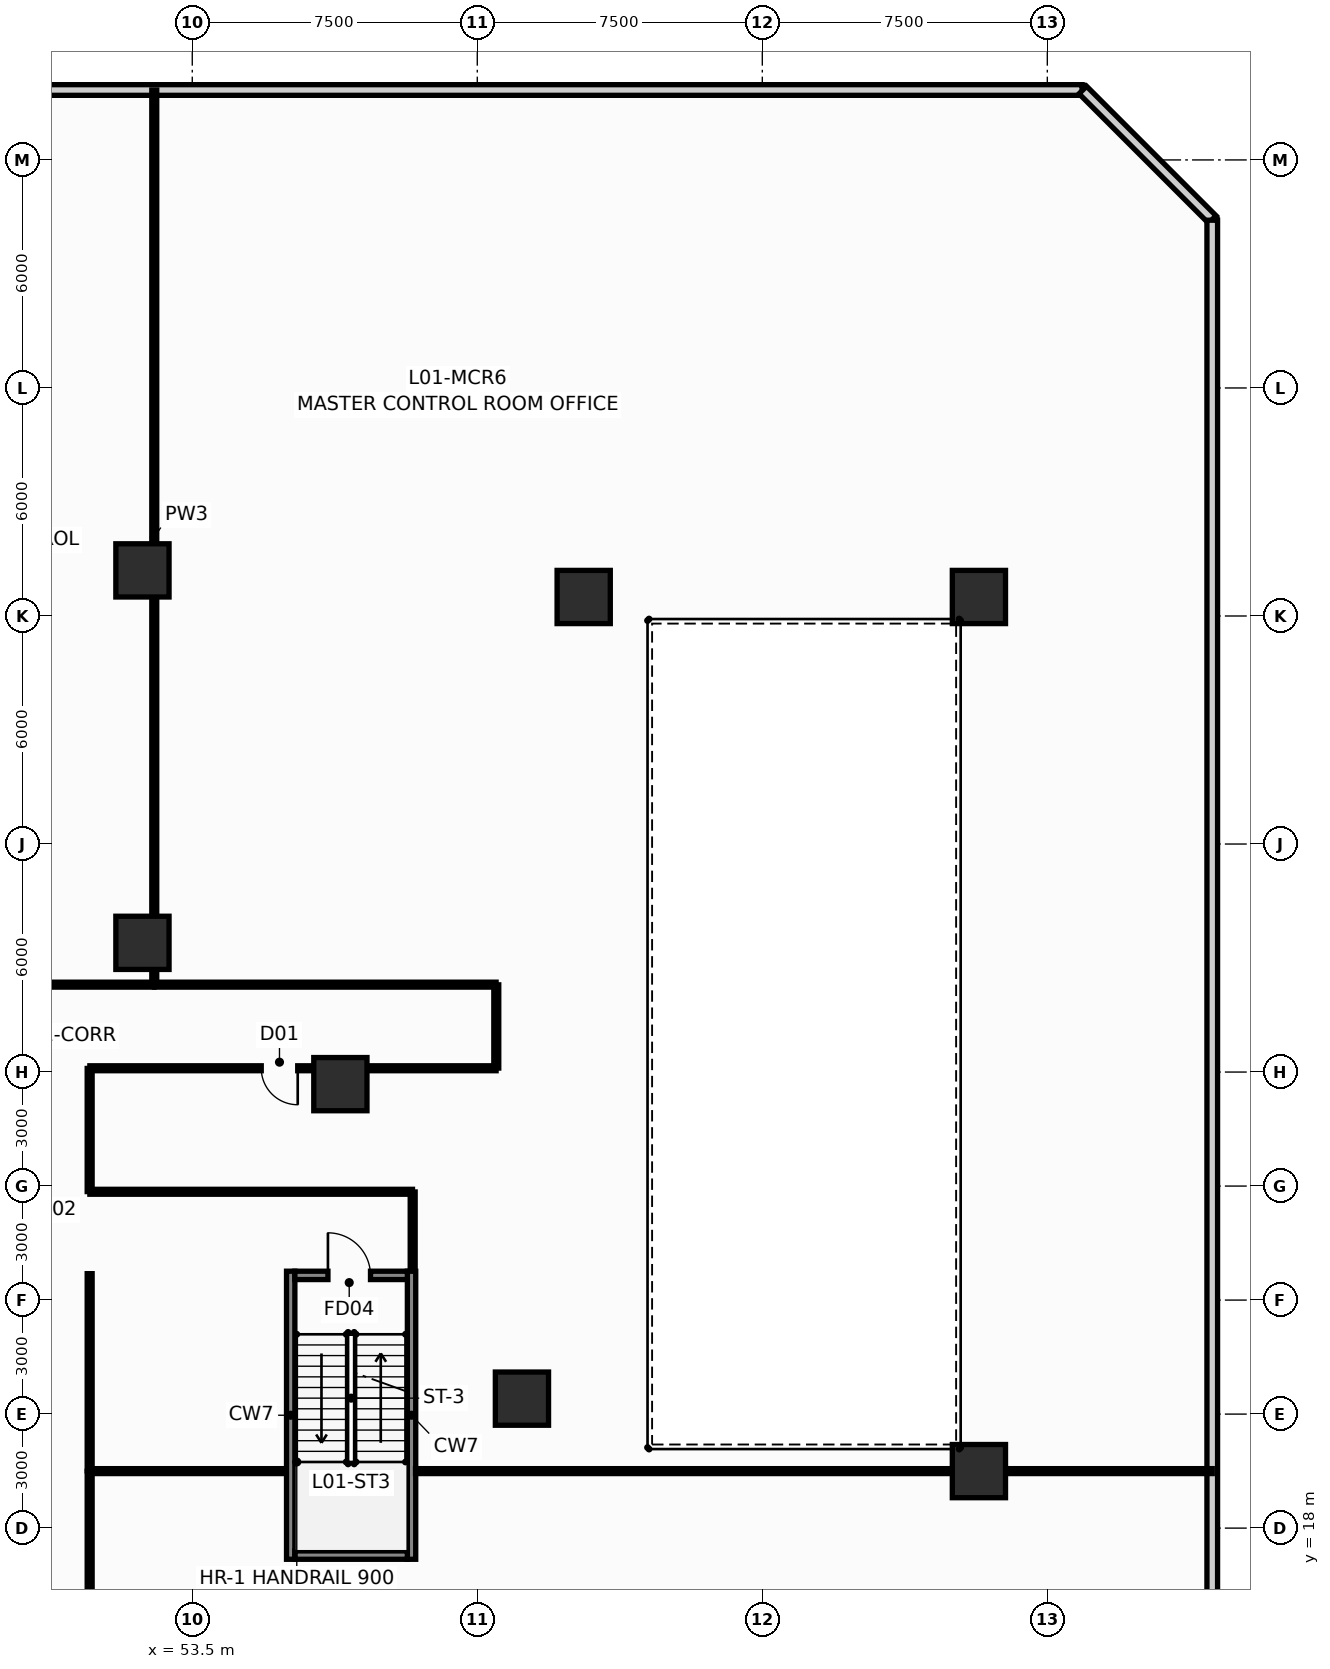
"""IFC4 building model, lengths in metres.
Left out: names, types, materials, properties, quantities, classifications, styles, units other than length and angle.
Written with IfcOpenShell. Run it as: python <this file> out.ifc"""

import sys

from ifc_helpers import new_model, si_unit, direction, frame, frame_2d, origin, origin_2d, place, context, subcontext, project, spatial, rectangle, hollow_rectangle, extrude, source, transform, mapped, element, fill, save


model = new_model("IFC4")
c1 = context("Model", 3, precision=1e-05, world=origin(), true_north=direction((0.0, 1.0)))
c2 = subcontext(c1, "Body", "Model", "MODEL_VIEW")
j1 = project(units=[si_unit("LENGTHUNIT", "METRE"), si_unit("PLANEANGLEUNIT", "RADIAN")], contexts=[c1])
p1 = place(None, origin())
s1 = spatial("IfcSite", under=j1, at=p1, CompositionType="ELEMENT")
p2 = place(p1, origin())
s2 = spatial("IfcBuilding", under=s1, at=p2, CompositionType="ELEMENT")
p3 = place(p2, frame((0.0, 0.0, 5.4)))
s3 = spatial("IfcBuildingStorey", under=s2, at=p3, CompositionType="ELEMENT", Elevation=5.4)
for number, where, z_axis, x_axis in (
    (1, (56.09, 17.18, 0.0), (0.0, 0.0, 1.0), (0.0, 1.0, 0.0)),
    (2, (59.27, 17.18, 0.0), (0.0, 0.0, 1.0), (0.0, 1.0, 0.0)),
):
    element("IfcWall", number, at=place(p3, frame(where, z_axis=z_axis, x_axis=x_axis)), inside=s3, PredefinedType="SHEAR", context=c2, shape_type="SweptSolid", body=[
        extrude(rectangle(XDim=7.58, YDim=0.22, at=frame_2d((3.79, 0.0))), origin(), (0.0, 0.0, 1.0), 4.8),
    ])
p4 = place(p3, frame((56.2, 17.29, 0.0), z_axis=(0.0, 0.0, 1.0), x_axis=(1.0, 0.0, 0.0)))
e3 = element("IfcWall", 3, at=p4, inside=s3, PredefinedType="SHEAR", context=c2, shape_type="SweptSolid", body=[
    extrude(rectangle(XDim=2.96, YDim=0.22, at=frame_2d((1.48, 0.0))), origin(), (0.0, 0.0, 1.0), 4.8),
])
p5 = place(p3, frame((56.2, 24.65, 0.0), z_axis=(0.0, 0.0, 1.0), x_axis=(1.0, 0.0, 0.0)))
e4 = element("IfcWall", 4, at=p5, inside=s3, PredefinedType="SHEAR", context=c2, shape_type="SweptSolid", body=[
    extrude(rectangle(XDim=2.96, YDim=0.22, at=frame_2d((1.48, 0.0))), origin(), (0.0, 0.0, 1.0), 4.8),
])
p6 = place(p5, frame((0.87, 0.0, 0.0)))
e5 = element("IfcOpeningElement", 5, at=p6, cuts=e4, PredefinedType="OPENING", context=c2, shape_type="SweptSolid", body=[
    extrude(rectangle(XDim=1.12, YDim=2.15, at=frame_2d((0.56, 1.075))), frame((0.0, 0.122, 0.0), z_axis=(0.0, -1.0, 0.0), x_axis=(1.0, 0.0, 0.0)), (0.0, 0.0, 1.0), 0.244),
])
m1 = source(origin(), c2, "Body", "SweptSolid", [
    extrude(hollow_rectangle(XDim=1.4, YDim=1.4, WallThickness=0.08, at=origin_2d()), origin(), (0.0, 0.0, 1.0), 4.802),
])
p7 = place(p3, frame((62.175, 21.407, 0.0), z_axis=(-0.01042374304, -0.021559351459, 0.999713228854), x_axis=(0.900293483537, -0.435283405956, 0.0)))
e6 = element("IfcColumn", 6, at=p7, inside=s3, PredefinedType="COLUMN", context=c2, shape_type="MappedRepresentation", body=[
    mapped(m1, transform((0.0, 0.0, 0.0), scale=1.0)),
])
m2 = source(origin(), c2, "Body", "SweptSolid", [
    extrude(hollow_rectangle(XDim=1.4, YDim=1.4, WallThickness=0.08, at=origin_2d()), origin(), (0.0, 0.0, 1.0), 4.801),
])
p8 = place(p3, frame((57.397, 29.682, 0.0), z_axis=(-0.014899529501, -0.013780793498, 0.999794025663), x_axis=(0.679008224545, -0.734130663438, 0.0)))
e7 = element("IfcColumn", 7, at=p8, inside=s3, PredefinedType="COLUMN", context=c2, shape_type="MappedRepresentation", body=[
    mapped(m2, transform((0.0, 0.0, 0.0), scale=1.0)),
])
m3 = source(origin(), c2, "Body", "SweptSolid", [
    extrude(hollow_rectangle(XDim=1.4, YDim=1.4, WallThickness=0.08, at=origin_2d()), origin(), (0.0, 0.0, 1.0), 4.8),
])
for number, where, z_axis, x_axis in (
    (8, (52.189, 33.4, 0.0), (0.0, 0.0, 1.0), (1.0, 0.0, 0.0)),
    (9, (52.189, 43.2, 0.0), (0.0, 0.0, 1.0), (1.0, 0.0, 0.0)),
    (10, (74.2, 19.5, 0.0), (0.0, 0.0, 1.0), (1.0, 0.0, 0.0)),
    (11, (74.2, 42.5, 0.0), (0.0, 0.0, 1.0), (1.0, 0.0, 0.0)),
    (12, (63.8, 42.5, 0.0), (0.0, 0.0, 1.0), (1.0, 0.0, 0.0)),
):
    element("IfcColumn", number, at=place(p3, frame(where, z_axis=z_axis, x_axis=x_axis)), inside=s3, PredefinedType="COLUMN", context=c2, shape_type="MappedRepresentation", body=[
        mapped(m3, transform((0.0, 0.0, 0.0), scale=1.0)),
    ])
p9 = place(p3, frame((5.086, 55.84, 0.0), z_axis=(0.0, 0.0, 1.0), x_axis=(1.0, 0.0, 0.0)))
e13 = element("IfcWall", 13, at=p9, inside=s3, PredefinedType="STANDARD", context=c2, shape_type="SweptSolid", body=[
    extrude(rectangle(XDim=71.828, YDim=0.28, at=frame_2d((35.914, 0.0))), origin(), (0.0, 0.0, 1.0), 4.48),
])
p10 = place(p3, frame((76.934, 55.84, 0.0), z_axis=(0.0, 0.0, 1.0), x_axis=(0.707106781187, -0.707106781187, 0.0)))
e14 = element("IfcWall", 14, at=p10, inside=s3, PredefinedType="STANDARD", context=c2, shape_type="SweptSolid", body=[
    extrude(rectangle(XDim=4.817, YDim=0.28, at=frame_2d((2.408, 0.0))), origin(), (0.0, 0.0, 1.0), 4.48),
])
p11 = place(p3, frame((80.34, 52.414, 0.0), z_axis=(0.0, 0.0, 1.0), x_axis=(0.0, -1.0, 0.0)))
e15 = element("IfcWall", 15, at=p11, inside=s3, PredefinedType="STANDARD", context=c2, shape_type="SweptSolid", body=[
    extrude(rectangle(XDim=47.828, YDim=0.28, at=frame_2d((23.914, 0.0))), origin(), (0.0, 0.0, 1.0), 4.48),
])
p12 = place(p3, frame((52.5, 32.305, 0.0), z_axis=(0.0, 0.0, 1.0), x_axis=(0.0, 1.0, 0.0)))
e16 = element("IfcWall", 16, at=p12, inside=s3, PredefinedType="PARTITIONING", context=c2, shape_type="SweptSolid", body=[
    extrude(rectangle(XDim=23.535, YDim=0.13, at=frame_2d((11.768, 0.0))), origin(), (0.0, 0.0, 1.0), 3.465),
])
p13 = place(p3, frame((59.375, 19.5, 0.0), z_axis=(0.0, 0.0, 1.0), x_axis=(1.0, 0.0, 0.0)))
e17 = element("IfcWall", 17, at=p13, inside=s3, PredefinedType="PARTITIONING", context=c2, shape_type="SweptSolid", body=[
    extrude(rectangle(XDim=20.965, YDim=0.13, at=frame_2d((10.482, 0.0))), origin(), (0.0, 0.0, 1.0), 2.665),
])
p14 = place(p3, frame((61.495, 30.1, 0.0), z_axis=(0.0, 0.0, 1.0), x_axis=(-1.0, 0.0, 0.0)))
e18 = element("IfcWall", 18, at=p14, inside=s3, PredefinedType="PARTITIONING", context=c2, shape_type="SweptSolid", body=[
    extrude(rectangle(XDim=10.69, YDim=0.13, at=frame_2d((5.345, 0.0))), origin(), (0.0, 0.0, 1.0), 3.854),
])
p15 = place(p14, frame((5.22, 0.0, 0.0)))
e19 = element("IfcOpeningElement", 19, at=p15, cuts=e18, PredefinedType="OPENING", context=c2, shape_type="SweptSolid", body=[
    extrude(rectangle(XDim=0.96, YDim=2.15, at=frame_2d((0.48, 1.075))), frame((0.0, 0.077, 0.0), z_axis=(0.0, -1.0, 0.0), x_axis=(1.0, 0.0, 0.0)), (0.0, 0.0, 1.0), 0.154),
])
p16 = place(p3, frame((42.505, 32.3, 0.0), z_axis=(0.0, 0.0, 1.0), x_axis=(1.0, 0.0, 0.0)))
e20 = element("IfcWall", 20, at=p16, inside=s3, PredefinedType="PARTITIONING", context=c2, shape_type="SweptSolid", body=[
    extrude(rectangle(XDim=9.99, YDim=0.13, at=frame_2d((4.995, 0.0))), origin(), (0.0, 0.0, 1.0), 4.48),
])
p17 = place(p16, frame((4.515, 0.0, 0.0)))
e21 = element("IfcOpeningElement", 21, at=p17, cuts=e20, PredefinedType="OPENING", context=c2, shape_type="SweptSolid", body=[
    extrude(rectangle(XDim=0.96, YDim=2.15, at=frame_2d((0.48, 1.075))), frame((0.0, 0.077, 0.0), z_axis=(0.0, -1.0, 0.0), x_axis=(1.0, 0.0, 0.0)), (0.0, 0.0, 1.0), 0.154),
])
p18 = place(p3, frame((52.505, 32.3, 0.0), z_axis=(0.0, 0.0, 1.0), x_axis=(1.0, 0.0, 0.0)))
e22 = element("IfcWall", 22, at=p18, inside=s3, PredefinedType="PARTITIONING", context=c2, shape_type="SweptSolid", body=[
    extrude(rectangle(XDim=8.99, YDim=0.13, at=frame_2d((4.495, 0.0))), origin(), (0.0, 0.0, 1.0), 4.48),
])
p19 = place(p3, frame((50.805, 26.85, 0.0), z_axis=(0.0, 0.0, 1.0), x_axis=(1.0, 0.0, 0.0)))
e23 = element("IfcWall", 23, at=p19, inside=s3, PredefinedType="PARTITIONING", context=c2, shape_type="SweptSolid", body=[
    extrude(rectangle(XDim=8.49, YDim=0.13, at=frame_2d((4.245, 0.0))), origin(), (0.0, 0.0, 1.0), 4.48),
])
p20 = place(p3, frame((50.8, 12.205, 0.0), z_axis=(0.0, 0.0, 1.0), x_axis=(0.0, 1.0, 0.0)))
e24 = element("IfcWall", 24, at=p20, inside=s3, PredefinedType="PARTITIONING", context=c2, shape_type="SweptSolid", body=[
    extrude(rectangle(XDim=7.29, YDim=0.13, at=frame_2d((3.645, 0.0))), origin(), (0.0, 0.0, 1.0), 4.48),
])
p21 = place(p20, frame((3.165, 0.0, 0.0)))
e25 = element("IfcOpeningElement", 25, at=p21, cuts=e24, PredefinedType="OPENING", context=c2, shape_type="SweptSolid", body=[
    extrude(rectangle(XDim=0.96, YDim=2.15, at=frame_2d((0.48, 1.075))), frame((0.0, 0.077, 0.0), z_axis=(0.0, -1.0, 0.0), x_axis=(1.0, 0.0, 0.0)), (0.0, 0.0, 1.0), 0.154),
])
p22 = place(p3, frame((50.805, 19.5, 0.0), z_axis=(0.0, 0.0, 1.0), x_axis=(1.0, 0.0, 0.0)))
e26 = element("IfcWall", 26, at=p22, inside=s3, PredefinedType="PARTITIONING", context=c2, shape_type="SweptSolid", body=[
    extrude(rectangle(XDim=5.17, YDim=0.13, at=frame_2d((2.585, 0.0))), origin(), (0.0, 0.0, 1.0), 4.48),
])
p23 = place(p3, frame((50.8, 24.695, 0.0), z_axis=(0.0, 0.0, 1.0), x_axis=(0.0, -1.0, 0.0)))
e27 = element("IfcWall", 27, at=p23, inside=s3, PredefinedType="PARTITIONING", context=c2, shape_type="SweptSolid", body=[
    extrude(rectangle(XDim=5.19, YDim=0.13, at=frame_2d((2.595, 0.0))), origin(), (0.0, 0.0, 1.0), 4.48),
])
p24 = place(p3, frame((50.8, 30.095, 0.0), z_axis=(0.0, 0.0, 1.0), x_axis=(0.0, -1.0, 0.0)))
e28 = element("IfcWall", 28, at=p24, inside=s3, PredefinedType="PARTITIONING", context=c2, shape_type="SweptSolid", body=[
    extrude(rectangle(XDim=3.24, YDim=0.13, at=frame_2d((1.62, 0.0))), origin(), (0.0, 0.0, 1.0), 4.48),
])
p25 = place(p3, frame((61.5, 32.295, 0.0), z_axis=(0.0, 0.0, 1.0), x_axis=(0.0, -1.0, 0.0)))
e29 = element("IfcWall", 29, at=p25, inside=s3, PredefinedType="PARTITIONING", context=c2, shape_type="SweptSolid", body=[
    extrude(rectangle(XDim=2.19, YDim=0.13, at=frame_2d((1.095, 0.0))), origin(), (0.0, 0.0, 1.0), 4.48),
])
p26 = place(p3, frame((59.3, 26.845, 0.0), z_axis=(0.0, 0.0, 1.0), x_axis=(0.0, -1.0, 0.0)))
e30 = element("IfcWall", 30, at=p26, inside=s3, PredefinedType="PARTITIONING", context=c2, shape_type="SweptSolid", body=[
    extrude(rectangle(XDim=2.07, YDim=0.13, at=frame_2d((1.035, 0.0))), origin(), (0.0, 0.0, 1.0), 4.48),
])
p27 = place(p6, origin())
e31 = element("IfcDoor", 31, at=p27, inside=s3, OperationType="SINGLE_SWING_LEFT", PredefinedType="DOOR", context=c2, shape_type="SweptSolid", body=[
    extrude(rectangle(XDim=1.12, YDim=2.15, at=frame_2d((0.56, 1.075))), frame((0.0, 0.025, 0.0), z_axis=(0.0, -1.0, 0.0), x_axis=(1.0, 0.0, 0.0)), (0.0, 0.0, 1.0), 0.05),
])
fill(e5, e31)
p28 = place(p15, origin())
e32 = element("IfcDoor", 32, at=p28, inside=s3, OperationType="SINGLE_SWING_LEFT", PredefinedType="DOOR", context=c2, shape_type="SweptSolid", body=[
    extrude(rectangle(XDim=0.96, YDim=2.15, at=frame_2d((0.48, 1.075))), frame((0.0, 0.025, 0.0), z_axis=(0.0, -1.0, 0.0), x_axis=(1.0, 0.0, 0.0)), (0.0, 0.0, 1.0), 0.05),
])
fill(e19, e32)
save(model, sys.argv[1])
